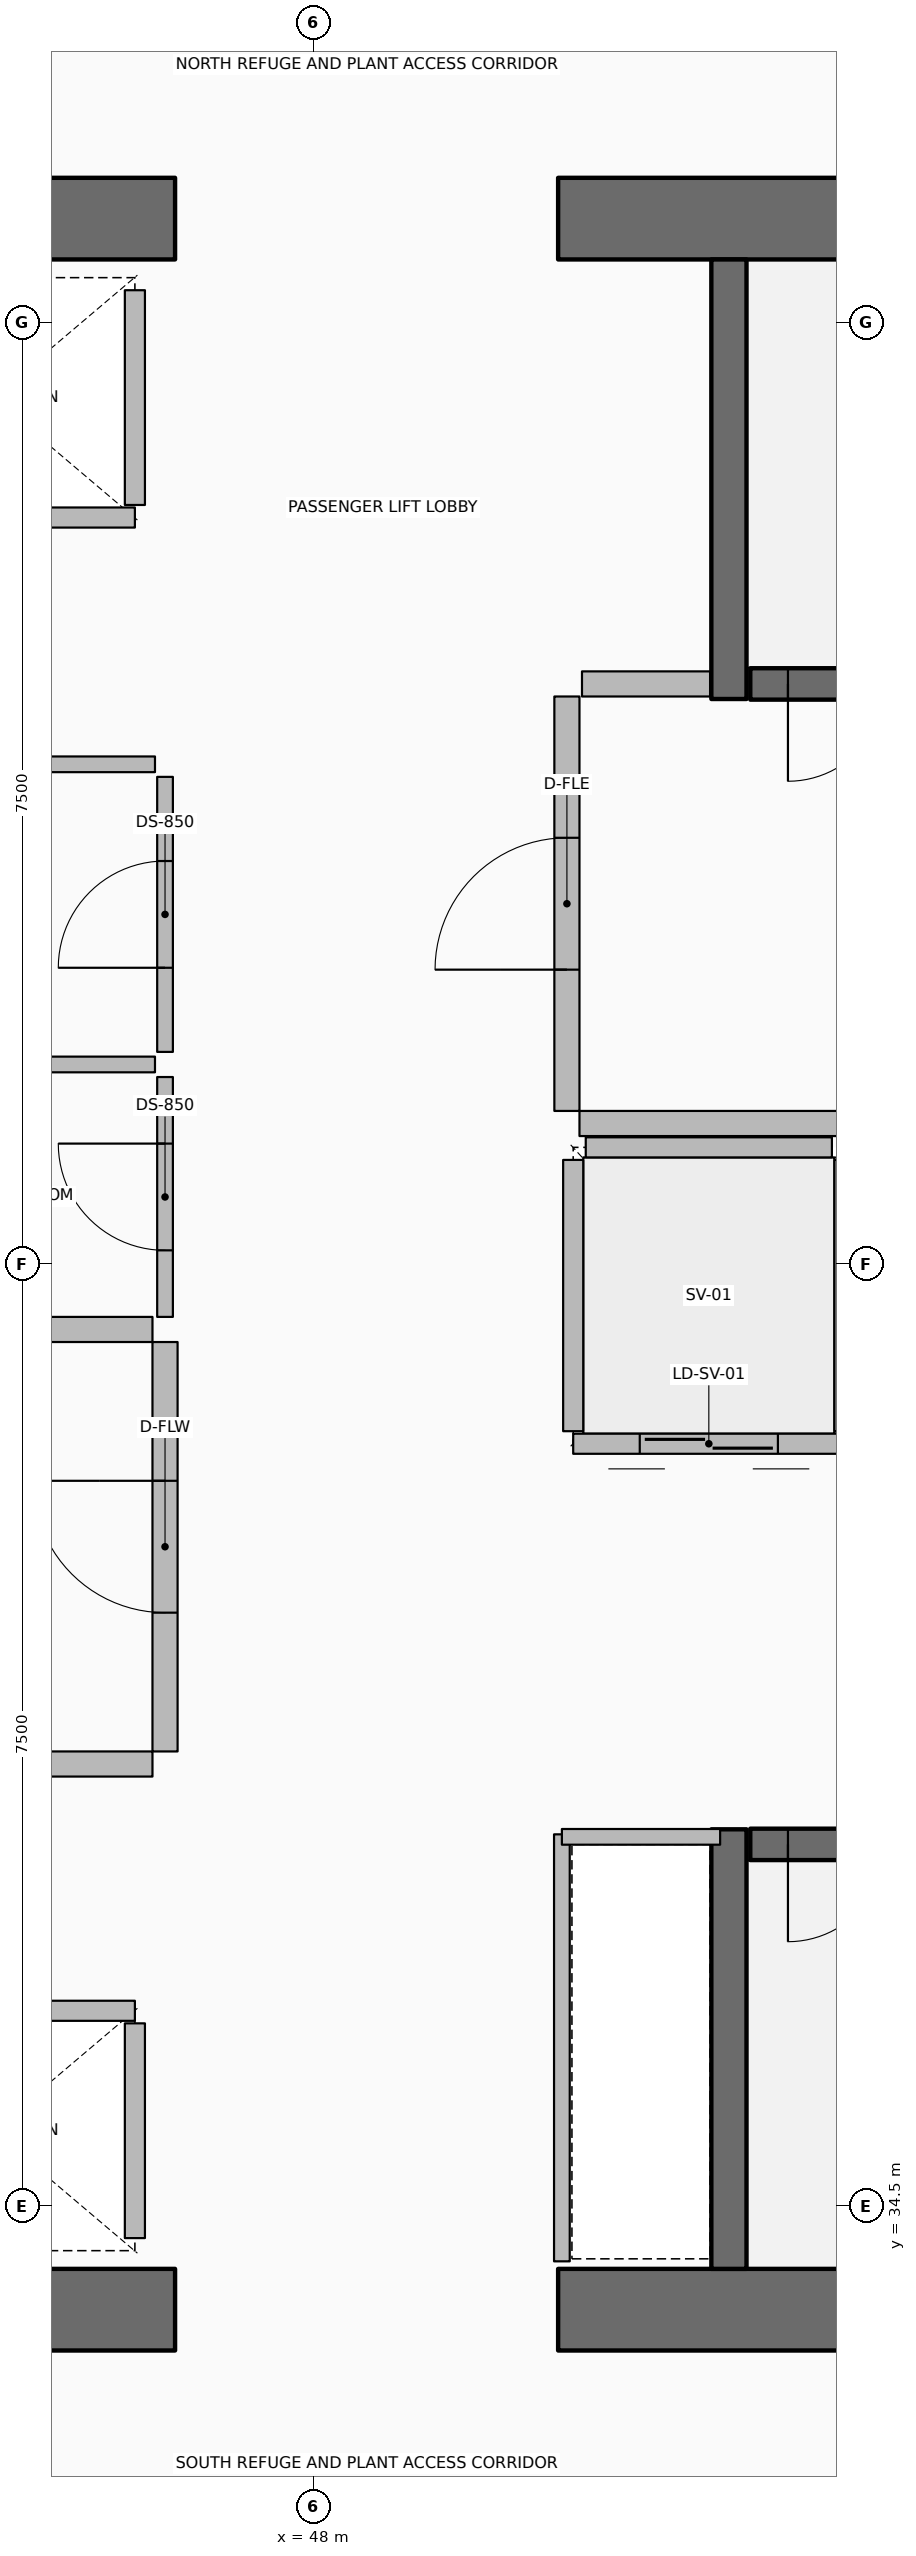
"""IFC4 building model, lengths in metres.
Left out: names, types, materials, properties, quantities, classifications, styles, units other than length and angle.
Written with IfcOpenShell. Run it as: python <this file> out.ifc"""

import sys

from ifc_helpers import new_model, si_unit, direction, frame, frame_2d, origin, place, context, subcontext, project, spatial, rectangle, extrude, element, fill, save


model = new_model("IFC4")
c1 = context("Model", 3, precision=1e-05, world=origin(), true_north=direction((0.0, 1.0)))
c2 = subcontext(c1, "Body", "Model", "MODEL_VIEW")
j1 = project(units=[si_unit("LENGTHUNIT", "METRE"), si_unit("PLANEANGLEUNIT", "RADIAN")], contexts=[c1])
p1 = place(None, origin())
s1 = spatial("IfcSite", under=j1, at=p1, CompositionType="ELEMENT")
p2 = place(p1, origin())
s2 = spatial("IfcBuilding", under=s1, at=p2, CompositionType="ELEMENT")
p3 = place(p2, frame((0.0, 0.0, 225.3)))
s3 = spatial("IfcBuildingStorey", under=s2, at=p3, CompositionType="ELEMENT", Elevation=225.3)
for number, where, z_axis, x_axis in (
    (1, (37.15, 33.675, 0.0), (0.0, 0.0, 1.0), (1.0, 0.0, 0.0)),
    (2, (49.95, 33.675, 0.0), (0.0, 0.0, 1.0), (1.0, 0.0, 0.0)),
    (3, (37.15, 50.325, 0.0), (0.0, 0.0, 1.0), (1.0, 0.0, 0.0)),
    (4, (49.95, 50.325, 0.0), (0.0, 0.0, 1.0), (1.0, 0.0, 0.0)),
):
    element("IfcWall", number, at=place(p3, frame(where, z_axis=z_axis, x_axis=x_axis)), inside=s3, PredefinedType="SHEAR", context=c2, shape_type="SweptSolid", body=[
        extrude(rectangle(XDim=9.75, YDim=0.65, at=frame_2d((4.875, 0.0))), origin(), (0.0, 0.0, 1.0), 6.6),
    ])
for number, where, z_axis, x_axis in (
    (5, (51.31, 46.5, 0.0), (0.0, 0.0, 1.0), (0.0, 1.0, 0.0)),
    (6, (51.31, 34.0, 0.0), (0.0, 0.0, 1.0), (0.0, 1.0, 0.0)),
):
    element("IfcWall", number, at=place(p3, frame(where, z_axis=z_axis, x_axis=x_axis)), inside=s3, PredefinedType="SHEAR", context=c2, shape_type="SweptSolid", body=[
        extrude(rectangle(XDim=3.5, YDim=0.28, at=frame_2d((1.75, 0.0))), origin(), (0.0, 0.0, 1.0), 6.6),
    ])
p4 = place(p3, frame((51.48, 46.62, 0.0), z_axis=(0.0, 0.0, 1.0), x_axis=(1.0, 0.0, 0.0)))
e7 = element("IfcWall", 7, at=p4, inside=s3, PredefinedType="SOLIDWALL", context=c2, shape_type="SweptSolid", body=[
    extrude(rectangle(XDim=7.54, YDim=0.25, at=frame_2d((3.77, 0.0))), origin(), (0.0, 0.0, 1.0), 6.28),
])
p5 = place(p4, frame((0.3, 0.0, 0.0)))
e8 = element("IfcOpeningElement", 8, at=p5, cuts=e7, PredefinedType="OPENING", context=c2, shape_type="SweptSolid", body=[
    extrude(rectangle(XDim=1.55, YDim=2.15, at=frame_2d((0.775, 1.075))), frame((0.0, 0.135, 0.0), z_axis=(0.0, -1.0, 0.0), x_axis=(1.0, 0.0, 0.0)), (0.0, 0.0, 1.0), 0.27),
])
p6 = place(p3, frame((51.48, 37.38, 0.0), z_axis=(0.0, 0.0, 1.0), x_axis=(1.0, 0.0, 0.0)))
e9 = element("IfcWall", 9, at=p6, inside=s3, PredefinedType="SOLIDWALL", context=c2, shape_type="SweptSolid", body=[
    extrude(rectangle(XDim=7.54, YDim=0.25, at=frame_2d((3.77, 0.0))), origin(), (0.0, 0.0, 1.0), 6.28),
])
p7 = place(p6, frame((0.3, 0.0, 0.0)))
e10 = element("IfcOpeningElement", 10, at=p7, cuts=e9, PredefinedType="OPENING", context=c2, shape_type="SweptSolid", body=[
    extrude(rectangle(XDim=1.55, YDim=2.15, at=frame_2d((0.775, 1.075))), frame((0.0, 0.135, 0.0), z_axis=(0.0, -1.0, 0.0), x_axis=(1.0, 0.0, 0.0)), (0.0, 0.0, 1.0), 0.27),
])
p8 = place(p3, frame((46.58, 47.945, 0.0), z_axis=(0.0, 0.0, 1.0), x_axis=(-1.0, 0.0, 0.0)))
e11 = element("IfcWall", 11, at=p8, inside=s3, PredefinedType="PARTITIONING", context=c2, shape_type="SweptSolid", body=[
    extrude(rectangle(XDim=2.26, YDim=0.16, at=frame_2d((1.13, 0.0))), origin(), (0.0, 0.0, 1.0), 6.28),
])
p9 = place(p3, frame((46.58, 48.045, 0.0), z_axis=(0.0, 0.0, 1.0), x_axis=(0.0, 1.0, 0.0)))
e12 = element("IfcWall", 12, at=p9, inside=s3, PredefinedType="PARTITIONING", context=c2, shape_type="SweptSolid", body=[
    extrude(rectangle(XDim=1.71, YDim=0.16, at=frame_2d((0.855, 0.0))), origin(), (0.0, 0.0, 1.0), 6.28),
])
p10 = place(p3, frame((44.32, 36.055, 0.0), z_axis=(0.0, 0.0, 1.0), x_axis=(1.0, 0.0, 0.0)))
e13 = element("IfcWall", 13, at=p10, inside=s3, PredefinedType="PARTITIONING", context=c2, shape_type="SweptSolid", body=[
    extrude(rectangle(XDim=2.26, YDim=0.16, at=frame_2d((1.13, 0.0))), origin(), (0.0, 0.0, 1.0), 6.28),
])
p11 = place(p3, frame((46.58, 34.245, 0.0), z_axis=(0.0, 0.0, 1.0), x_axis=(0.0, 1.0, 0.0)))
e14 = element("IfcWall", 14, at=p11, inside=s3, PredefinedType="PARTITIONING", context=c2, shape_type="SweptSolid", body=[
    extrude(rectangle(XDim=1.71, YDim=0.16, at=frame_2d((0.855, 0.0))), origin(), (0.0, 0.0, 1.0), 6.28),
])
p12 = place(p3, frame((52.23, 40.57, 0.0), z_axis=(0.0, 0.0, 1.0), x_axis=(-1.0, 0.0, 0.0)))
e15 = element("IfcWall", 15, at=p12, inside=s3, PredefinedType="PARTITIONING", context=c2, shape_type="SweptSolid", body=[
    extrude(rectangle(XDim=2.16, YDim=0.16, at=frame_2d((1.08, 0.0))), origin(), (0.0, 0.0, 1.0), 6.28),
])
p13 = place(p12, frame((0.53, 0.0, 0.0)))
e16 = element("IfcOpeningElement", 16, at=p13, cuts=e15, PredefinedType="OPENING", context=c2, shape_type="SweptSolid", body=[
    extrude(rectangle(XDim=1.1, YDim=2.1, at=frame_2d((0.55, 1.05))), frame((0.0, 0.09, 0.0), z_axis=(0.0, -1.0, 0.0), x_axis=(1.0, 0.0, 0.0)), (0.0, 0.0, 1.0), 0.18),
])
for number, where, z_axis, x_axis in (
    (17, (52.23, 40.67, 0.0), (0.0, 0.0, 1.0), (0.0, 1.0, 0.0)),
    (18, (50.07, 40.67, 0.0), (0.0, 0.0, 1.0), (0.0, 1.0, 0.0)),
):
    element("IfcWall", number, at=place(p3, frame(where, z_axis=z_axis, x_axis=x_axis)), inside=s3, PredefinedType="PARTITIONING", context=c2, shape_type="SweptSolid", body=[
        extrude(rectangle(XDim=2.16, YDim=0.16, at=frame_2d((1.08, 0.0))), origin(), (0.0, 0.0, 1.0), 6.28),
    ])
p14 = place(p3, frame((50.17, 42.93, 0.0), z_axis=(0.0, 0.0, 1.0), x_axis=(1.0, 0.0, 0.0)))
e19 = element("IfcWall", 19, at=p14, inside=s3, PredefinedType="PARTITIONING", context=c2, shape_type="SweptSolid", body=[
    extrude(rectangle(XDim=1.96, YDim=0.16, at=frame_2d((0.98, 0.0))), origin(), (0.0, 0.0, 1.0), 6.28),
])
p15 = place(p3, frame((41.35, 38.02, 0.0), z_axis=(0.0, 0.0, 1.0), x_axis=(1.0, 0.0, 0.0)))
e20 = element("IfcWall", 20, at=p15, inside=s3, PredefinedType="PARTITIONING", context=c2, shape_type="SweptSolid", body=[
    extrude(rectangle(XDim=5.37, YDim=0.2, at=frame_2d((2.685, 0.0))), origin(), (0.0, 0.0, 1.0), 6.28),
])
p16 = place(p3, frame((43.92, 41.48, 0.0), z_axis=(0.0, 0.0, 1.0), x_axis=(1.0, 0.0, 0.0)))
e21 = element("IfcWall", 21, at=p16, inside=s3, PredefinedType="PARTITIONING", context=c2, shape_type="SweptSolid", body=[
    extrude(rectangle(XDim=2.8, YDim=0.2, at=frame_2d((1.4, 0.0))), origin(), (0.0, 0.0, 1.0), 6.28),
])
p17 = place(p3, frame((46.82, 38.12, 0.0), z_axis=(0.0, 0.0, 1.0), x_axis=(0.0, 1.0, 0.0)))
e22 = element("IfcWall", 22, at=p17, inside=s3, PredefinedType="PARTITIONING", context=c2, shape_type="SweptSolid", body=[
    extrude(rectangle(XDim=3.26, YDim=0.2, at=frame_2d((1.63, 0.0))), origin(), (0.0, 0.0, 1.0), 6.28),
])
p18 = place(p17, frame((1.105, 0.0, 0.0)))
e23 = element("IfcOpeningElement", 23, at=p18, cuts=e22, PredefinedType="OPENING", context=c2, shape_type="SweptSolid", body=[
    extrude(rectangle(XDim=1.05, YDim=2.1, at=frame_2d((0.525, 1.05))), frame((0.0, 0.11, 0.0), z_axis=(0.0, -1.0, 0.0), x_axis=(1.0, 0.0, 0.0)), (0.0, 0.0, 1.0), 0.22),
])
p19 = place(p3, frame((50.12, 43.12, 0.0), z_axis=(0.0, 0.0, 1.0), x_axis=(1.0, 0.0, 0.0)))
e24 = element("IfcWall", 24, at=p19, inside=s3, PredefinedType="PARTITIONING", context=c2, shape_type="SweptSolid", body=[
    extrude(rectangle(XDim=8.88, YDim=0.2, at=frame_2d((4.44, 0.0))), origin(), (0.0, 0.0, 1.0), 6.28),
])
p20 = place(p3, frame((50.14, 46.62, 0.0), z_axis=(0.0, 0.0, 1.0), x_axis=(1.0, 0.0, 0.0)))
e25 = element("IfcWall", 25, at=p20, inside=s3, PredefinedType="PARTITIONING", context=c2, shape_type="SweptSolid", body=[
    extrude(rectangle(XDim=1.02, YDim=0.2, at=frame_2d((0.51, 0.0))), origin(), (0.0, 0.0, 1.0), 6.28),
])
p21 = place(p3, frame((50.02, 43.22, 0.0), z_axis=(0.0, 0.0, 1.0), x_axis=(0.0, 1.0, 0.0)))
e26 = element("IfcWall", 26, at=p21, inside=s3, PredefinedType="PARTITIONING", context=c2, shape_type="SweptSolid", body=[
    extrude(rectangle(XDim=3.3, YDim=0.2, at=frame_2d((1.65, 0.0))), origin(), (0.0, 0.0, 1.0), 6.28),
])
p22 = place(p21, frame((1.125, 0.0, 0.0)))
e27 = element("IfcOpeningElement", 27, at=p22, cuts=e26, PredefinedType="OPENING", context=c2, shape_type="SweptSolid", body=[
    extrude(rectangle(XDim=1.05, YDim=2.1, at=frame_2d((0.525, 1.05))), frame((0.0, 0.11, 0.0), z_axis=(0.0, -1.0, 0.0), x_axis=(1.0, 0.0, 0.0)), (0.0, 0.0, 1.0), 0.22),
])
p23 = place(p3, frame((49.98, 34.06, 0.0), z_axis=(0.0, 0.0, 1.0), x_axis=(0.0, 1.0, 0.0)))
e28 = element("IfcWall", 28, at=p23, inside=s3, PredefinedType="PARTITIONING", context=c2, shape_type="SweptSolid", body=[
    extrude(rectangle(XDim=3.4, YDim=0.125, at=frame_2d((1.7, 0.0))), origin(), (0.0, 0.0, 1.0), 5.72),
])
p24 = place(p3, frame((49.98, 37.44, 0.0), z_axis=(0.0, 0.0, 1.0), x_axis=(1.0, 0.0, 0.0)))
e29 = element("IfcWall", 29, at=p24, inside=s3, PredefinedType="PARTITIONING", context=c2, shape_type="SweptSolid", body=[
    extrude(rectangle(XDim=1.26, YDim=0.125, at=frame_2d((0.63, 0.0))), origin(), (0.0, 0.0, 1.0), 5.72),
])
p25 = place(p3, frame((44.03, 43.59, 0.0), z_axis=(0.0, 0.0, 1.0), x_axis=(1.0, 0.0, 0.0)))
e30 = element("IfcWall", 30, at=p25, inside=s3, PredefinedType="PARTITIONING", context=c2, shape_type="SweptSolid", body=[
    extrude(rectangle(XDim=2.71, YDim=0.125, at=frame_2d((1.355, 0.0))), origin(), (0.0, 0.0, 1.0), 5.72),
])
p26 = place(p3, frame((46.82, 41.58, 0.0), z_axis=(0.0, 0.0, 1.0), x_axis=(0.0, 1.0, 0.0)))
e31 = element("IfcWall", 31, at=p26, inside=s3, PredefinedType="PARTITIONING", context=c2, shape_type="SweptSolid", body=[
    extrude(rectangle(XDim=1.91, YDim=0.125, at=frame_2d((0.955, 0.0))), origin(), (0.0, 0.0, 1.0), 5.72),
])
p27 = place(p26, frame((0.53, 0.0, 0.0)))
e32 = element("IfcOpeningElement", 32, at=p27, cuts=e31, PredefinedType="OPENING", context=c2, shape_type="SweptSolid", body=[
    extrude(rectangle(XDim=0.85, YDim=2.06, at=frame_2d((0.425, 1.03))), frame((0.0, 0.073, 0.0), z_axis=(0.0, -1.0, 0.0), x_axis=(1.0, 0.0, 0.0)), (0.0, 0.0, 1.0), 0.145),
])
p28 = place(p3, frame((46.82, 43.69, 0.0), z_axis=(0.0, 0.0, 1.0), x_axis=(0.0, 1.0, 0.0)))
e33 = element("IfcWall", 33, at=p28, inside=s3, PredefinedType="PARTITIONING", context=c2, shape_type="SweptSolid", body=[
    extrude(rectangle(XDim=2.19, YDim=0.125, at=frame_2d((1.095, 0.0))), origin(), (0.0, 0.0, 1.0), 5.72),
])
p29 = place(p28, frame((0.67, 0.0, 0.0)))
e34 = element("IfcOpeningElement", 34, at=p29, cuts=e33, PredefinedType="OPENING", context=c2, shape_type="SweptSolid", body=[
    extrude(rectangle(XDim=0.85, YDim=2.06, at=frame_2d((0.425, 1.03))), frame((0.0, 0.073, 0.0), z_axis=(0.0, -1.0, 0.0), x_axis=(1.0, 0.0, 0.0)), (0.0, 0.0, 1.0), 0.145),
])
p30 = place(p3, frame((45.48, 45.98, 0.0), z_axis=(0.0, 0.0, 1.0), x_axis=(1.0, 0.0, 0.0)))
e35 = element("IfcWall", 35, at=p30, inside=s3, PredefinedType="PARTITIONING", context=c2, shape_type="SweptSolid", body=[
    extrude(rectangle(XDim=1.26, YDim=0.125, at=frame_2d((0.63, 0.0))), origin(), (0.0, 0.0, 1.0), 5.72),
])
p31 = place(p5, origin())
e36 = element("IfcDoor", 36, at=p31, inside=s3, OperationType="DOUBLE_DOOR_SINGLE_SWING", PredefinedType="DOOR", context=c2, shape_type="SweptSolid", body=[
    extrude(rectangle(XDim=1.55, YDim=2.15, at=frame_2d((0.775, 1.075))), frame((0.0, 0.025, 0.0), z_axis=(0.0, -1.0, 0.0), x_axis=(1.0, 0.0, 0.0)), (0.0, 0.0, 1.0), 0.05),
])
fill(e8, e36)
p32 = place(p7, origin())
e37 = element("IfcDoor", 37, at=p32, inside=s3, OperationType="DOUBLE_DOOR_SINGLE_SWING", PredefinedType="DOOR", context=c2, shape_type="SweptSolid", body=[
    extrude(rectangle(XDim=1.55, YDim=2.15, at=frame_2d((0.775, 1.075))), frame((0.0, 0.025, 0.0), z_axis=(0.0, -1.0, 0.0), x_axis=(1.0, 0.0, 0.0)), (0.0, 0.0, 1.0), 0.05),
])
fill(e10, e37)
p33 = place(p13, origin())
e38 = element("IfcDoor", 38, at=p33, inside=s3, OperationType="DOUBLE_DOOR_SLIDING", PredefinedType="DOOR", context=c2, shape_type="SweptSolid", body=[
    extrude(rectangle(XDim=1.1, YDim=2.1, at=frame_2d((0.55, 1.05))), frame((0.0, 0.025, 0.0), z_axis=(0.0, -1.0, 0.0), x_axis=(1.0, 0.0, 0.0)), (0.0, 0.0, 1.0), 0.05),
])
fill(e16, e38)
p34 = place(p18, origin())
e39 = element("IfcDoor", 39, at=p34, inside=s3, OperationType="SINGLE_SWING_RIGHT", PredefinedType="DOOR", context=c2, shape_type="SweptSolid", body=[
    extrude(rectangle(XDim=1.05, YDim=2.1, at=frame_2d((0.525, 1.05))), frame((0.0, 0.025, 0.0), z_axis=(0.0, -1.0, 0.0), x_axis=(1.0, 0.0, 0.0)), (0.0, 0.0, 1.0), 0.05),
])
fill(e23, e39)
p35 = place(p22, origin())
e40 = element("IfcDoor", 40, at=p35, inside=s3, OperationType="SINGLE_SWING_LEFT", PredefinedType="DOOR", context=c2, shape_type="SweptSolid", body=[
    extrude(rectangle(XDim=1.05, YDim=2.1, at=frame_2d((0.525, 1.05))), frame((0.0, 0.025, 0.0), z_axis=(0.0, -1.0, 0.0), x_axis=(1.0, 0.0, 0.0)), (0.0, 0.0, 1.0), 0.05),
])
fill(e27, e40)
p36 = place(p27, origin())
e41 = element("IfcDoor", 41, at=p36, inside=s3, OperationType="SINGLE_SWING_RIGHT", PredefinedType="DOOR", context=c2, shape_type="SweptSolid", body=[
    extrude(rectangle(XDim=0.85, YDim=2.06, at=frame_2d((0.425, 1.03))), frame((0.0, 0.025, 0.0), z_axis=(0.0, -1.0, 0.0), x_axis=(1.0, 0.0, 0.0)), (0.0, 0.0, 1.0), 0.05),
])
fill(e32, e41)
p37 = place(p29, origin())
e42 = element("IfcDoor", 42, at=p37, inside=s3, OperationType="SINGLE_SWING_LEFT", PredefinedType="DOOR", context=c2, shape_type="SweptSolid", body=[
    extrude(rectangle(XDim=0.85, YDim=2.06, at=frame_2d((0.425, 1.03))), frame((0.0, 0.025, 0.0), z_axis=(0.0, -1.0, 0.0), x_axis=(1.0, 0.0, 0.0)), (0.0, 0.0, 1.0), 0.05),
])
fill(e34, e42)
save(model, sys.argv[1])
